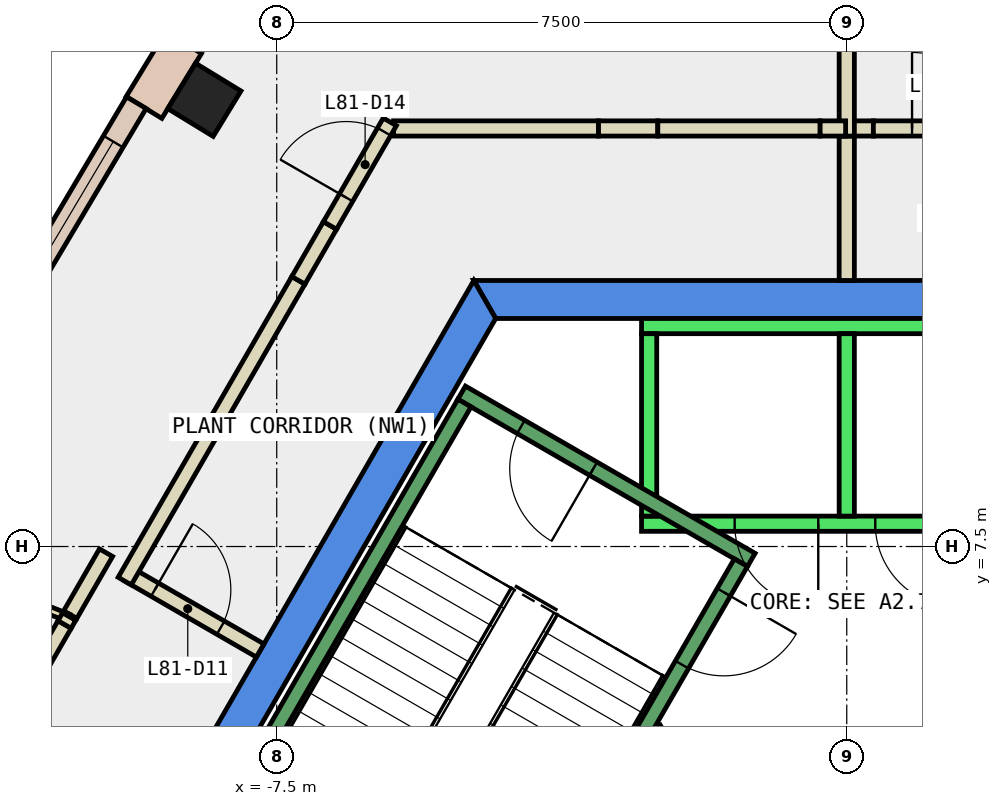
"""IFC4 building model, lengths in metres.
Left out: names, types, materials, properties, quantities, classifications, styles, units other than length and angle.
Written with IfcOpenShell. Run it as: python <this file> out.ifc"""

import sys

from ifc_helpers import new_model, si_unit, direction, frame, frame_2d, origin, origin_2d, place, context, subcontext, project, spatial, polyline, rectangle, outline, extrude, element, fill, save


model = new_model("IFC4")
c1 = context("Model", 3, precision=1e-05, world=origin(), true_north=direction((0.0, 1.0)))
c2 = subcontext(c1, "Body", "Model", "MODEL_VIEW")
j1 = project(units=[si_unit("LENGTHUNIT", "METRE"), si_unit("PLANEANGLEUNIT", "RADIAN")], contexts=[c1])
p1 = place(None, origin())
s1 = spatial("IfcSite", under=j1, at=p1, CompositionType="ELEMENT")
p2 = place(p1, origin())
s2 = spatial("IfcBuilding", under=s1, at=p2, CompositionType="ELEMENT")
p3 = place(p2, frame((0.0, 0.0, 344.9)))
s3 = spatial("IfcBuildingStorey", under=s2, at=p3, CompositionType="ELEMENT", Elevation=344.9)
p4 = place(p3, frame((-8.452, 13.377, -0.35), z_axis=(0.0, 0.0, 1.0), x_axis=(0.521545830745, 0.853223268806, 0.0)))
e1 = element("IfcColumn", 1, at=p4, inside=s3, PredefinedType="COLUMN", context=c2, shape_type="SweptSolid", body=[
    extrude(rectangle(XDim=0.7, YDim=0.7, at=origin_2d()), origin(), (0.0, 0.0, 1.0), 4.4),
])
p5 = place(p3, frame((0.0, 0.0, -0.35)))
e2 = element("IfcWall", 2, at=p5, inside=s3, PredefinedType="SHEAR", context=c2, shape_type="SweptSolid", body=[
    extrude(outline(polyline([(4.907, 11.0), (-4.907, 11.0), (-4.619, 10.5), (4.619, 10.5), (4.907, 11.0)])), origin(), (0.0, 0.0, 1.0), 4.4),
])
p6 = place(p3, frame((0.0, 0.0, -0.35)))
e3 = element("IfcWall", 3, at=p6, inside=s3, PredefinedType="SHEAR", context=c2, shape_type="SweptSolid", body=[
    extrude(outline(polyline([(-9.236, 3.502), (-8.803, 3.253), (-4.619, 10.5), (-4.907, 11.0), (-9.236, 3.502)])), origin(), (0.0, 0.0, 1.0), 4.4),
])
p7 = place(p3, frame((-8.725, 14.129, 0.0), z_axis=(0.0, 0.0, 1.0), x_axis=(-0.521232636172, -0.853414634857, 0.0)))
e4 = element("IfcWall", 4, at=p7, inside=s3, PredefinedType="STANDARD", context=c2, shape_type="SweptSolid", body=[
    extrude(rectangle(XDim=1.0, YDim=0.55, at=frame_2d((0.5, 0.0))), origin(), (0.0, 0.0, 1.0), 4.05),
])
p8 = place(p3, frame((-9.347, 13.339, 0.0), z_axis=(0.0, 0.0, 1.0), x_axis=(-0.510686403068, -0.859767060152, 0.0)))
e5 = element("IfcWall", 5, at=p8, inside=s3, PredefinedType="STANDARD", context=c2, shape_type="SweptSolid", body=[
    extrude(rectangle(XDim=6.38, YDim=0.3, at=frame_2d((3.19, 0.0))), origin(), (0.0, 0.0, 1.0), 4.05),
])
p9 = place(p8, frame((0.595, 0.0, 0.9)))
e6 = element("IfcOpeningElement", 6, at=p9, cuts=e5, PredefinedType="OPENING", context=c2, shape_type="SweptSolid", body=[
    extrude(rectangle(XDim=2.0, YDim=3.0, at=frame_2d((1.0, 1.5))), frame((0.0, 0.16, 0.0), z_axis=(0.0, -1.0, 0.0), x_axis=(1.0, 0.0, 0.0)), (0.0, 0.0, 1.0), 0.32),
])
p10 = place(p8, frame((3.785, 0.0, 0.9)))
e7 = element("IfcOpeningElement", 7, at=p10, cuts=e5, PredefinedType="OPENING", context=c2, shape_type="SweptSolid", body=[
    extrude(rectangle(XDim=2.0, YDim=3.0, at=frame_2d((1.0, 1.5))), frame((0.0, 0.16, 0.0), z_axis=(0.0, -1.0, 0.0), x_axis=(1.0, 0.0, 0.0)), (0.0, 0.0, 1.0), 0.32),
])
p11 = place(p3, frame((-2.54, 5.1, 0.0), z_axis=(0.0, 0.0, 1.0), x_axis=(0.499925051871, -0.866068670783, 0.0)))
e8 = element("IfcWall", 8, at=p11, inside=s3, PredefinedType="PARTITIONING", context=c2, shape_type="SweptSolid", body=[
    extrude(rectangle(XDim=5.181, YDim=0.2, at=frame_2d((2.59, 0.0))), origin(), (0.0, 0.0, 1.0), 4.05),
])
p12 = place(p11, frame((2.04, 0.0, 0.0)))
e9 = element("IfcOpeningElement", 9, at=p12, cuts=e8, PredefinedType="OPENING", context=c2, shape_type="SweptSolid", body=[
    extrude(rectangle(XDim=1.0, YDim=2.1, at=frame_2d((0.5, 1.05))), frame((0.0, 0.11, 0.0), z_axis=(0.0, -1.0, 0.0), x_axis=(1.0, 0.0, 0.0)), (0.0, 0.0, 1.0), 0.22),
])
p13 = place(p3, frame((0.015, 13.0, 0.0), z_axis=(0.0, 0.0, 1.0), x_axis=(1.0, 0.0, 0.0)))
e10 = element("IfcWall", 10, at=p13, inside=s3, PredefinedType="PARTITIONING", context=c2, shape_type="SweptSolid", body=[
    extrude(rectangle(XDim=0.335, YDim=0.2, at=frame_2d((0.167, 0.0))), origin(), (0.0, 0.0, 1.0), 1.95),
])
p14 = place(p3, frame((0.0, 11.0, 0.0), z_axis=(0.0, 0.0, 1.0), x_axis=(0.0, 1.0, 0.0)))
e11 = element("IfcWall", 11, at=p14, inside=s3, PredefinedType="PARTITIONING", context=c2, shape_type="SweptSolid", body=[
    extrude(rectangle(XDim=1.9, YDim=0.2, at=frame_2d((0.95, 0.0))), origin(), (0.0, 0.0, 1.0), 1.95),
])
p15 = place(p3, frame((0.0, 12.9, 0.0), z_axis=(0.0, 0.0, 1.0), x_axis=(0.0, 1.0, 0.0)))
e12 = element("IfcWall", 12, at=p15, inside=s3, PredefinedType="PARTITIONING", context=c2, shape_type="SweptSolid", body=[
    extrude(rectangle(XDim=7.756, YDim=0.2, at=frame_2d((3.878, 0.0))), origin(), (0.0, 0.0, 1.0), 1.95),
])
p16 = place(p3, frame((-9.45, 7.132, 0.0), z_axis=(0.0, 0.0, 1.0), x_axis=(0.866010750942, -0.50002537861, 0.0)))
e13 = element("IfcWall", 13, at=p16, inside=s3, PredefinedType="PARTITIONING", context=c2, shape_type="SweptSolid", body=[
    extrude(rectangle(XDim=2.0, YDim=0.2, at=frame_2d((1.0, 0.0))), origin(), (0.0, 0.0, 1.0), 4.05),
])
p17 = place(p16, frame((0.4, 0.0, 0.0)))
e14 = element("IfcOpeningElement", 14, at=p17, cuts=e13, PredefinedType="OPENING", context=c2, shape_type="SweptSolid", body=[
    extrude(rectangle(XDim=1.0, YDim=2.1, at=frame_2d((0.5, 1.05))), frame((0.0, 0.11, 0.0), z_axis=(0.0, -1.0, 0.0), x_axis=(1.0, 0.0, 0.0)), (0.0, 0.0, 1.0), 0.22),
])
p18 = place(p3, frame((-10.216, 6.604, 0.0), z_axis=(0.0, 0.0, 1.0), x_axis=(0.499572668549, 0.866271983178, 0.0)))
e15 = element("IfcWall", 15, at=p18, inside=s3, PredefinedType="PARTITIONING", context=c2, shape_type="SweptSolid", body=[
    extrude(rectangle(XDim=0.941, YDim=0.2, at=frame_2d((0.47, 0.0))), origin(), (0.0, 0.0, 1.0), 4.05),
])
p19 = place(p3, frame((-9.5, 7.045, 0.0), z_axis=(0.0, 0.0, 1.0), x_axis=(0.500052367415, 0.865995167332, 0.0)))
e16 = element("IfcWall", 16, at=p19, inside=s3, PredefinedType="PARTITIONING", context=c2, shape_type="SweptSolid", body=[
    extrude(rectangle(XDim=4.569, YDim=0.2, at=frame_2d((2.285, 0.0))), origin(), (0.0, 0.0, 1.0), 4.05),
])
p20 = place(p3, frame((-5.962, 13.0, 0.0), z_axis=(0.0, 0.0, 1.0), x_axis=(1.0, 0.0, 0.0)))
e17 = element("IfcWall", 17, at=p20, inside=s3, PredefinedType="PARTITIONING", context=c2, shape_type="SweptSolid", body=[
    extrude(rectangle(XDim=2.696, YDim=0.2, at=frame_2d((1.348, 0.0))), origin(), (0.0, 0.0, 1.0), 4.05),
])
p21 = place(p3, frame((-11.726, 7.15, 0.0), z_axis=(0.0, 0.0, 1.0), x_axis=(0.929589639936, -0.36859612223, 0.0)))
e18 = element("IfcWall", 18, at=p21, inside=s3, PredefinedType="PARTITIONING", context=c2, shape_type="SweptSolid", body=[
    extrude(rectangle(XDim=1.598, YDim=0.1, at=frame_2d((0.799, 0.0))), origin(), (0.0, 0.0, 1.0), 1.95),
])
p22 = place(p3, frame((0.35, 13.0, 0.0), z_axis=(0.0, 0.0, 1.0), x_axis=(1.0, 0.0, 0.0)))
e19 = element("IfcWall", 19, at=p22, inside=s3, PredefinedType="PARTITIONING", context=c2, shape_type="SweptSolid", body=[
    extrude(rectangle(XDim=2.136, YDim=0.2, at=frame_2d((1.068, 0.0))), origin(), (0.0, 0.0, 1.0), 4.05),
])
p23 = place(p22, frame((0.509, 0.0, 0.0)))
e20 = element("IfcOpeningElement", 20, at=p23, cuts=e19, PredefinedType="OPENING", context=c2, shape_type="SweptSolid", body=[
    extrude(rectangle(XDim=1.0, YDim=2.1, at=frame_2d((0.5, 1.05))), frame((0.0, 0.11, 0.0), z_axis=(0.0, -1.0, 0.0), x_axis=(1.0, 0.0, 0.0)), (0.0, 0.0, 1.0), 0.22),
])
p24 = place(p3, frame((-10.666, 5.824, 0.0), z_axis=(0.0, 0.0, 1.0), x_axis=(0.499637970844, 0.866234320545, 0.0)))
e21 = element("IfcWall", 21, at=p24, inside=s3, PredefinedType="PARTITIONING", context=c2, shape_type="SweptSolid", body=[
    extrude(rectangle(XDim=0.75, YDim=0.2, at=frame_2d((0.375, 0.0))), origin(), (0.0, 0.0, 1.0), 1.95),
])
p25 = place(p3, frame((-10.291, 6.474, 0.0), z_axis=(0.0, 0.0, 1.0), x_axis=(0.500955995102, 0.865472755765, 0.0)))
e22 = element("IfcWall", 22, at=p25, inside=s3, PredefinedType="PARTITIONING", context=c2, shape_type="SweptSolid", body=[
    extrude(rectangle(XDim=0.12, YDim=0.2, at=frame_2d((0.06, 0.0))), origin(), (0.0, 0.0, 1.0), 4.05),
])
p26 = place(p3, frame((-7.215, 11.002, 0.0), z_axis=(0.0, 0.0, 1.0), x_axis=(0.499164436756, 0.866507279299, 0.0)))
e23 = element("IfcWall", 23, at=p26, inside=s3, PredefinedType="PARTITIONING", context=c2, shape_type="SweptSolid", body=[
    extrude(rectangle(XDim=0.833, YDim=0.2, at=frame_2d((0.417, 0.0))), origin(), (0.0, 0.0, 1.0), 1.95),
])
p27 = place(p3, frame((-6.799, 11.724, 0.0), z_axis=(0.0, 0.0, 1.0), x_axis=(0.50014319453, 0.865942714598, 0.0)))
e24 = element("IfcWall", 24, at=p27, inside=s3, PredefinedType="PARTITIONING", context=c2, shape_type="SweptSolid", body=[
    extrude(rectangle(XDim=1.574, YDim=0.2, at=frame_2d((0.787, 0.0))), origin(), (0.0, 0.0, 1.0), 4.05),
])
p28 = place(p27, frame((0.424, 0.0, 0.0)))
e25 = element("IfcOpeningElement", 25, at=p28, cuts=e24, PredefinedType="OPENING", context=c2, shape_type="SweptSolid", body=[
    extrude(rectangle(XDim=1.0, YDim=2.1, at=frame_2d((0.5, 1.05))), frame((0.0, 0.11, 0.0), z_axis=(0.0, -1.0, 0.0), x_axis=(1.0, 0.0, 0.0)), (0.0, 0.0, 1.0), 0.22),
])
p29 = place(p3, frame((-3.266, 13.0, 0.0), z_axis=(0.0, 0.0, 1.0), x_axis=(1.0, 0.0, 0.0)))
e26 = element("IfcWall", 26, at=p29, inside=s3, PredefinedType="PARTITIONING", context=c2, shape_type="SweptSolid", body=[
    extrude(rectangle(XDim=0.78, YDim=0.2, at=frame_2d((0.39, 0.0))), origin(), (0.0, 0.0, 1.0), 1.95),
])
p30 = place(p3, frame((-2.486, 13.0, 0.0), z_axis=(0.0, 0.0, 1.0), x_axis=(1.0, 0.0, 0.0)))
e27 = element("IfcWall", 27, at=p30, inside=s3, PredefinedType="PARTITIONING", context=c2, shape_type="SweptSolid", body=[
    extrude(rectangle(XDim=2.136, YDim=0.2, at=frame_2d((1.068, 0.0))), origin(), (0.0, 0.0, 1.0), 4.05),
])
p31 = place(p3, frame((-0.35, 13.0, 0.0), z_axis=(0.0, 0.0, 1.0), x_axis=(1.0, 0.0, 0.0)))
e28 = element("IfcWall", 28, at=p31, inside=s3, PredefinedType="PARTITIONING", context=c2, shape_type="SweptSolid", body=[
    extrude(rectangle(XDim=0.335, YDim=0.2, at=frame_2d((0.167, 0.0))), origin(), (0.0, 0.0, 1.0), 1.95),
])
p32 = place(p3, frame((2.7, 7.8, 0.0), z_axis=(0.0, 0.0, 1.0), x_axis=(-1.0, 0.0, 0.0)))
e29 = element("IfcWall", 29, at=p32, inside=s3, PredefinedType="STANDARD", context=c2, shape_type="SweptSolid", body=[
    extrude(rectangle(XDim=5.4, YDim=0.2, at=frame_2d((2.7, 0.0))), origin(), (0.0, 0.0, 1.0), 4.05),
])
p33 = place(p32, frame((1.225, 0.0, 0.0)))
e30 = element("IfcOpeningElement", 30, at=p33, cuts=e29, PredefinedType="OPENING", context=c2, shape_type="SweptSolid", body=[
    extrude(rectangle(XDim=1.1, YDim=2.1, at=frame_2d((0.55, 1.05))), frame((0.0, 0.11, 0.0), z_axis=(0.0, -1.0, 0.0), x_axis=(1.0, 0.0, 0.0)), (0.0, 0.0, 1.0), 0.22),
])
p34 = place(p32, frame((3.075, 0.0, 0.0)))
e31 = element("IfcOpeningElement", 31, at=p34, cuts=e29, PredefinedType="OPENING", context=c2, shape_type="SweptSolid", body=[
    extrude(rectangle(XDim=1.1, YDim=2.1, at=frame_2d((0.55, 1.05))), frame((0.0, 0.11, 0.0), z_axis=(0.0, -1.0, 0.0), x_axis=(1.0, 0.0, 0.0)), (0.0, 0.0, 1.0), 0.22),
])
p35 = place(p3, frame((2.7, 10.4, 0.0), z_axis=(0.0, 0.0, 1.0), x_axis=(-1.0, 0.0, 0.0)))
e32 = element("IfcWall", 32, at=p35, inside=s3, PredefinedType="STANDARD", context=c2, shape_type="SweptSolid", body=[
    extrude(rectangle(XDim=5.4, YDim=0.2, at=frame_2d((2.7, 0.0))), origin(), (0.0, 0.0, 1.0), 4.05),
])
for number, where, z_axis, x_axis in (
    (33, (0.0, 7.9, 0.0), (0.0, 0.0, 1.0), (0.0, 1.0, 0.0)),
    (34, (-2.6, 7.9, 0.0), (0.0, 0.0, 1.0), (0.0, 1.0, 0.0)),
):
    element("IfcWall", number, at=place(p3, frame(where, z_axis=z_axis, x_axis=x_axis)), inside=s3, PredefinedType="STANDARD", context=c2, shape_type="SweptSolid", body=[
        extrude(rectangle(XDim=2.4, YDim=0.2, at=frame_2d((1.2, 0.0))), origin(), (0.0, 0.0, 1.0), 4.05),
    ])
p36 = place(p3, frame((-1.256, 7.324, 0.0), z_axis=(0.0, 0.0, 1.0), x_axis=(-0.866046073146, 0.499964197906, 0.0)))
e35 = element("IfcWall", 35, at=p36, inside=s3, PredefinedType="STANDARD", context=c2, shape_type="SweptSolid", body=[
    extrude(rectangle(XDim=4.4, YDim=0.2, at=frame_2d((2.2, 0.0))), origin(), (0.0, 0.0, 1.0), 4.05),
])
p37 = place(p36, frame((2.4, 0.0, 0.0)))
e36 = element("IfcOpeningElement", 36, at=p37, cuts=e35, PredefinedType="OPENING", context=c2, shape_type="SweptSolid", body=[
    extrude(rectangle(XDim=1.1, YDim=2.2, at=frame_2d((0.55, 1.1))), frame((0.0, 0.11, 0.0), z_axis=(0.0, -1.0, 0.0), x_axis=(1.0, 0.0, 0.0)), (0.0, 0.0, 1.0), 0.22),
])
p38 = place(p3, frame((-1.393, 7.288, 0.0), z_axis=(0.0, 0.0, 1.0), x_axis=(-0.499963383562, -0.866046543262, 0.0)))
e37 = element("IfcWall", 37, at=p38, inside=s3, PredefinedType="STANDARD", context=c2, shape_type="SweptSolid", body=[
    extrude(rectangle(XDim=6.9, YDim=0.2, at=frame_2d((3.45, 0.0))), origin(), (0.0, 0.0, 1.0), 4.05),
])
p39 = place(p38, frame((0.45, 0.0, 0.0)))
e38 = element("IfcOpeningElement", 38, at=p39, cuts=e37, PredefinedType="OPENING", context=c2, shape_type="SweptSolid", body=[
    extrude(rectangle(XDim=1.1, YDim=2.2, at=frame_2d((0.55, 1.1))), frame((0.0, 0.11, 0.0), z_axis=(0.0, -1.0, 0.0), x_axis=(1.0, 0.0, 0.0)), (0.0, 0.0, 1.0), 0.22),
])
p40 = place(p3, frame((-5.03, 9.388, 0.0), z_axis=(0.0, 0.0, 1.0), x_axis=(-0.499978703459, -0.866037698999, 0.0)))
e39 = element("IfcWall", 39, at=p40, inside=s3, PredefinedType="STANDARD", context=c2, shape_type="SweptSolid", body=[
    extrude(rectangle(XDim=6.9, YDim=0.2, at=frame_2d((3.45, 0.0))), origin(), (0.0, 0.0, 1.0), 4.05),
])
p41 = place(p9, origin())
e40 = element("IfcWindow", 40, at=p41, inside=s3, PartitioningType="SINGLE_PANEL", PredefinedType="WINDOW", context=c2, shape_type="SweptSolid", body=[
    extrude(rectangle(XDim=2.0, YDim=3.0, at=frame_2d((1.0, 1.5))), frame((0.0, 0.03, 0.0), z_axis=(0.0, -1.0, 0.0), x_axis=(1.0, 0.0, 0.0)), (0.0, 0.0, 1.0), 0.06),
])
fill(e6, e40)
p42 = place(p23, origin())
e41 = element("IfcDoor", 41, at=p42, inside=s3, OperationType="SINGLE_SWING_LEFT", PredefinedType="DOOR", context=c2, shape_type="SweptSolid", body=[
    extrude(rectangle(XDim=1.0, YDim=2.1, at=frame_2d((0.5, 1.05))), frame((0.0, 0.025, 0.0), z_axis=(0.0, -1.0, 0.0), x_axis=(1.0, 0.0, 0.0)), (0.0, 0.0, 1.0), 0.05),
])
fill(e20, e41)
p43 = place(p17, origin())
e42 = element("IfcDoor", 42, at=p43, inside=s3, OperationType="SINGLE_SWING_LEFT", PredefinedType="DOOR", context=c2, shape_type="SweptSolid", body=[
    extrude(rectangle(XDim=1.0, YDim=2.1, at=frame_2d((0.5, 1.05))), frame((0.0, 0.025, 0.0), z_axis=(0.0, -1.0, 0.0), x_axis=(1.0, 0.0, 0.0)), (0.0, 0.0, 1.0), 0.05),
])
fill(e14, e42)
p44 = place(p28, origin())
e43 = element("IfcDoor", 43, at=p44, inside=s3, OperationType="SINGLE_SWING_RIGHT", PredefinedType="DOOR", context=c2, shape_type="SweptSolid", body=[
    extrude(rectangle(XDim=1.0, YDim=2.1, at=frame_2d((0.5, 1.05))), frame((0.0, 0.025, 0.0), z_axis=(0.0, -1.0, 0.0), x_axis=(1.0, 0.0, 0.0)), (0.0, 0.0, 1.0), 0.05),
])
fill(e25, e43)
p45 = place(p33, origin())
e44 = element("IfcDoor", 44, at=p45, inside=s3, OperationType="SLIDING_TO_LEFT", PredefinedType="DOOR", context=c2, shape_type="SweptSolid", body=[
    extrude(rectangle(XDim=1.1, YDim=2.1, at=frame_2d((0.55, 1.05))), frame((0.0, 0.025, 0.0), z_axis=(0.0, -1.0, 0.0), x_axis=(1.0, 0.0, 0.0)), (0.0, 0.0, 1.0), 0.05),
])
fill(e30, e44)
p46 = place(p34, origin())
e45 = element("IfcDoor", 45, at=p46, inside=s3, OperationType="SLIDING_TO_LEFT", PredefinedType="DOOR", context=c2, shape_type="SweptSolid", body=[
    extrude(rectangle(XDim=1.1, YDim=2.1, at=frame_2d((0.55, 1.05))), frame((0.0, 0.025, 0.0), z_axis=(0.0, -1.0, 0.0), x_axis=(1.0, 0.0, 0.0)), (0.0, 0.0, 1.0), 0.05),
])
fill(e31, e45)
p47 = place(p39, origin())
e46 = element("IfcDoor", 46, at=p47, inside=s3, OperationType="SINGLE_SWING_LEFT", PredefinedType="DOOR", context=c2, shape_type="SweptSolid", body=[
    extrude(rectangle(XDim=1.1, YDim=2.2, at=frame_2d((0.55, 1.1))), frame((0.0, 0.025, 0.0), z_axis=(0.0, -1.0, 0.0), x_axis=(1.0, 0.0, 0.0)), (0.0, 0.0, 1.0), 0.05),
])
fill(e38, e46)
p48 = place(p37, origin())
e47 = element("IfcDoor", 47, at=p48, inside=s3, OperationType="SINGLE_SWING_LEFT", PredefinedType="DOOR", context=c2, shape_type="SweptSolid", body=[
    extrude(rectangle(XDim=1.1, YDim=2.2, at=frame_2d((0.55, 1.1))), frame((0.0, 0.025, 0.0), z_axis=(0.0, -1.0, 0.0), x_axis=(1.0, 0.0, 0.0)), (0.0, 0.0, 1.0), 0.05),
])
fill(e36, e47)
save(model, sys.argv[1])
